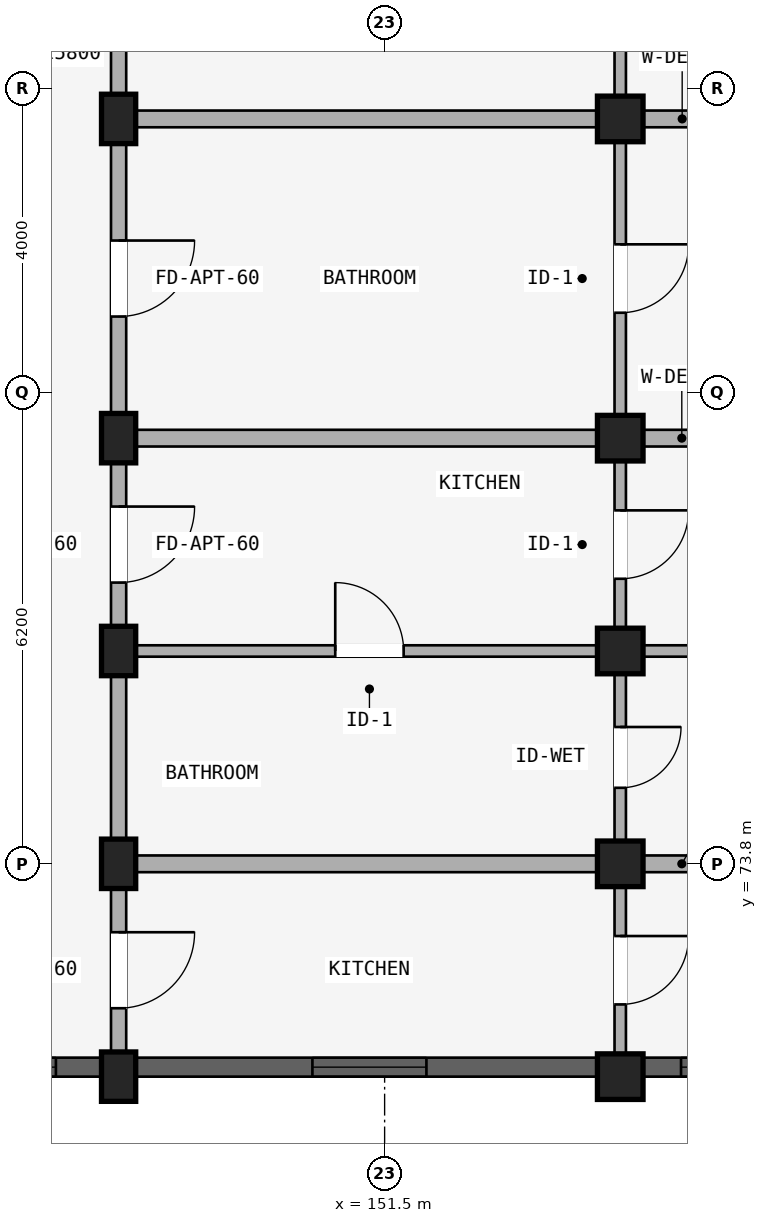
"""IFC4 building model, lengths in metres.
Left out: names, types, materials, properties, quantities, classifications, styles, units other than length and angle.
Written with IfcOpenShell. Run it as: python <this file> out.ifc"""

import sys

from ifc_helpers import new_model, si_unit, direction, frame, frame_2d, origin, origin_2d, place, context, subcontext, project, spatial, rectangle, extrude, element, fill, save


model = new_model("IFC4")
c1 = context("Model", 3, precision=1e-05, world=origin(), true_north=direction((0.0, 1.0)))
c2 = subcontext(c1, "Body", "Model", "MODEL_VIEW")
j1 = project(units=[si_unit("LENGTHUNIT", "METRE"), si_unit("PLANEANGLEUNIT", "RADIAN")], contexts=[c1])
p1 = place(None, origin())
s1 = spatial("IfcSite", under=j1, at=p1, CompositionType="ELEMENT")
p2 = place(p1, origin())
s2 = spatial("IfcBuilding", under=s1, at=p2, CompositionType="ELEMENT")
p3 = place(p2, frame((0.0, 0.0, 30.75)))
s3 = spatial("IfcBuildingStorey", under=s2, at=p3, CompositionType="ELEMENT", Elevation=30.75)
p4 = place(p3, frame((148.0, 83.6, 0.0), z_axis=(0.0, 0.0, 1.0), x_axis=(1.0, 0.0, 0.0)))
e1 = element("IfcColumn", 1, at=p4, inside=s3, PredefinedType="COLUMN", context=c2, shape_type="SweptSolid", body=[
    extrude(rectangle(XDim=0.45, YDim=0.65, at=origin_2d()), origin(), (0.0, 0.0, 1.0), 2.93),
])
p5 = place(p3, frame((154.6, 83.6, 0.0), z_axis=(0.0, 0.0, 1.0), x_axis=(1.0, 0.0, 0.0)))
e2 = element("IfcColumn", 2, at=p5, inside=s3, PredefinedType="COLUMN", context=c2, shape_type="SweptSolid", body=[
    extrude(rectangle(XDim=0.6, YDim=0.6, at=origin_2d()), origin(), (0.0, 0.0, 1.0), 2.93),
])
p6 = place(p3, frame((148.0, 79.4, 0.0), z_axis=(0.0, 0.0, 1.0), x_axis=(1.0, 0.0, 0.0)))
e3 = element("IfcColumn", 3, at=p6, inside=s3, PredefinedType="COLUMN", context=c2, shape_type="SweptSolid", body=[
    extrude(rectangle(XDim=0.45, YDim=0.65, at=origin_2d()), origin(), (0.0, 0.0, 1.0), 2.93),
])
p7 = place(p3, frame((154.6, 79.4, 0.0), z_axis=(0.0, 0.0, 1.0), x_axis=(1.0, 0.0, 0.0)))
e4 = element("IfcColumn", 4, at=p7, inside=s3, PredefinedType="COLUMN", context=c2, shape_type="SweptSolid", body=[
    extrude(rectangle(XDim=0.6, YDim=0.6, at=origin_2d()), origin(), (0.0, 0.0, 1.0), 2.93),
])
p8 = place(p3, frame((148.0, 76.6, 0.0), z_axis=(0.0, 0.0, 1.0), x_axis=(1.0, 0.0, 0.0)))
e5 = element("IfcColumn", 5, at=p8, inside=s3, PredefinedType="COLUMN", context=c2, shape_type="SweptSolid", body=[
    extrude(rectangle(XDim=0.45, YDim=0.65, at=origin_2d()), origin(), (0.0, 0.0, 1.0), 2.93),
])
p9 = place(p3, frame((154.6, 76.6, 0.0), z_axis=(0.0, 0.0, 1.0), x_axis=(1.0, 0.0, 0.0)))
e6 = element("IfcColumn", 6, at=p9, inside=s3, PredefinedType="COLUMN", context=c2, shape_type="SweptSolid", body=[
    extrude(rectangle(XDim=0.6, YDim=0.6, at=origin_2d()), origin(), (0.0, 0.0, 1.0), 2.93),
])
p10 = place(p3, frame((148.0, 73.8, 0.0), z_axis=(0.0, 0.0, 1.0), x_axis=(1.0, 0.0, 0.0)))
e7 = element("IfcColumn", 7, at=p10, inside=s3, PredefinedType="COLUMN", context=c2, shape_type="SweptSolid", body=[
    extrude(rectangle(XDim=0.45, YDim=0.65, at=origin_2d()), origin(), (0.0, 0.0, 1.0), 2.93),
])
p11 = place(p3, frame((154.6, 73.8, 0.0), z_axis=(0.0, 0.0, 1.0), x_axis=(1.0, 0.0, 0.0)))
e8 = element("IfcColumn", 8, at=p11, inside=s3, PredefinedType="COLUMN", context=c2, shape_type="SweptSolid", body=[
    extrude(rectangle(XDim=0.6, YDim=0.6, at=origin_2d()), origin(), (0.0, 0.0, 1.0), 2.93),
])
p12 = place(p3, frame((148.0, 71.0, 0.0), z_axis=(0.0, 0.0, 1.0), x_axis=(1.0, 0.0, 0.0)))
e9 = element("IfcColumn", 9, at=p12, inside=s3, PredefinedType="COLUMN", context=c2, shape_type="SweptSolid", body=[
    extrude(rectangle(XDim=0.45, YDim=0.65, at=origin_2d()), origin(), (0.0, 0.0, 1.0), 2.93),
])
p13 = place(p3, frame((154.6, 71.0, 0.0), z_axis=(0.0, 0.0, 1.0), x_axis=(1.0, 0.0, 0.0)))
e10 = element("IfcColumn", 10, at=p13, inside=s3, PredefinedType="COLUMN", context=c2, shape_type="SweptSolid", body=[
    extrude(rectangle(XDim=0.6, YDim=0.6, at=origin_2d()), origin(), (0.0, 0.0, 1.0), 2.93),
])
p14 = place(p3, frame((148.0, 87.65, 0.0), z_axis=(0.0, 0.0, 1.0), x_axis=(0.0, -1.0, 0.0)))
e11 = element("IfcWall", 11, at=p14, inside=s3, PredefinedType="STANDARD", context=c2, shape_type="SweptSolid", body=[
    extrude(rectangle(XDim=4.05, YDim=0.2, at=frame_2d((2.025, 0.0))), origin(), (0.0, 0.0, 1.0), 2.372),
])
p15 = place(p14, frame((1.525, 0.0, 0.0)))
e12 = element("IfcOpeningElement", 12, at=p15, cuts=e11, PredefinedType="OPENING", context=c2, shape_type="SweptSolid", body=[
    extrude(rectangle(XDim=1.0, YDim=2.15, at=frame_2d((0.5, 1.075))), frame((0.0, 0.11, 0.0), z_axis=(0.0, -1.0, 0.0), x_axis=(1.0, 0.0, 0.0)), (0.0, 0.0, 1.0), 0.22),
])
p16 = place(p3, frame((154.6, 87.57, 0.0), z_axis=(0.0, 0.0, 1.0), x_axis=(0.0, -1.0, 0.0)))
e13 = element("IfcWall", 13, at=p16, inside=s3, PredefinedType="PARTITIONING", context=c2, shape_type="SweptSolid", body=[
    extrude(rectangle(XDim=3.89, YDim=0.15, at=frame_2d((1.945, 0.0))), origin(), (0.0, 0.0, 1.0), 2.372),
])
p17 = place(p16, frame((1.495, 0.0, 0.0)))
e14 = element("IfcOpeningElement", 14, at=p17, cuts=e13, PredefinedType="OPENING", context=c2, shape_type="SweptSolid", body=[
    extrude(rectangle(XDim=0.9, YDim=2.1, at=frame_2d((0.45, 1.05))), frame((0.0, 0.085, 0.0), z_axis=(0.0, -1.0, 0.0), x_axis=(1.0, 0.0, 0.0)), (0.0, 0.0, 1.0), 0.17),
])
p18 = place(p3, frame((148.0, 83.6, 0.0), z_axis=(0.0, 0.0, 1.0), x_axis=(0.0, -1.0, 0.0)))
e15 = element("IfcWall", 15, at=p18, inside=s3, PredefinedType="STANDARD", context=c2, shape_type="SweptSolid", body=[
    extrude(rectangle(XDim=4.2, YDim=0.2, at=frame_2d((2.1, 0.0))), origin(), (0.0, 0.0, 1.0), 2.372),
])
p19 = place(p18, frame((1.6, 0.0, 0.0)))
e16 = element("IfcOpeningElement", 16, at=p19, cuts=e15, PredefinedType="OPENING", context=c2, shape_type="SweptSolid", body=[
    extrude(rectangle(XDim=1.0, YDim=2.15, at=frame_2d((0.5, 1.075))), frame((0.0, 0.11, 0.0), z_axis=(0.0, -1.0, 0.0), x_axis=(1.0, 0.0, 0.0)), (0.0, 0.0, 1.0), 0.22),
])
p20 = place(p3, frame((154.6, 83.52, 0.0), z_axis=(0.0, 0.0, 1.0), x_axis=(0.0, -1.0, 0.0)))
e17 = element("IfcWall", 17, at=p20, inside=s3, PredefinedType="PARTITIONING", context=c2, shape_type="SweptSolid", body=[
    extrude(rectangle(XDim=4.04, YDim=0.15, at=frame_2d((2.02, 0.0))), origin(), (0.0, 0.0, 1.0), 2.372),
])
p21 = place(p20, frame((1.57, 0.0, 0.0)))
e18 = element("IfcOpeningElement", 18, at=p21, cuts=e17, PredefinedType="OPENING", context=c2, shape_type="SweptSolid", body=[
    extrude(rectangle(XDim=0.9, YDim=2.1, at=frame_2d((0.45, 1.05))), frame((0.0, 0.085, 0.0), z_axis=(0.0, -1.0, 0.0), x_axis=(1.0, 0.0, 0.0)), (0.0, 0.0, 1.0), 0.17),
])
p22 = place(p3, frame((148.05, 83.6, 0.0), z_axis=(0.0, 0.0, 1.0), x_axis=(1.0, 0.0, 0.0)))
e19 = element("IfcWall", 19, at=p22, inside=s3, PredefinedType="STANDARD", context=c2, shape_type="SweptSolid", body=[
    extrude(rectangle(XDim=14.73, YDim=0.22, at=frame_2d((7.365, 0.0))), origin(), (0.0, 0.0, 1.0), 2.372),
])
p23 = place(p3, frame((148.0, 79.4, 0.0), z_axis=(0.0, 0.0, 1.0), x_axis=(0.0, -1.0, 0.0)))
e20 = element("IfcWall", 20, at=p23, inside=s3, PredefinedType="STANDARD", context=c2, shape_type="SweptSolid", body=[
    extrude(rectangle(XDim=2.8, YDim=0.2, at=frame_2d((1.4, 0.0))), origin(), (0.0, 0.0, 1.0), 2.372),
])
p24 = place(p23, frame((0.9, 0.0, 0.0)))
e21 = element("IfcOpeningElement", 21, at=p24, cuts=e20, PredefinedType="OPENING", context=c2, shape_type="SweptSolid", body=[
    extrude(rectangle(XDim=1.0, YDim=2.15, at=frame_2d((0.5, 1.075))), frame((0.0, 0.11, 0.0), z_axis=(0.0, -1.0, 0.0), x_axis=(1.0, 0.0, 0.0)), (0.0, 0.0, 1.0), 0.22),
])
p25 = place(p3, frame((154.6, 79.32, 0.0), z_axis=(0.0, 0.0, 1.0), x_axis=(0.0, -1.0, 0.0)))
e22 = element("IfcWall", 22, at=p25, inside=s3, PredefinedType="PLUMBINGWALL", context=c2, shape_type="SweptSolid", body=[
    extrude(rectangle(XDim=2.64, YDim=0.15, at=frame_2d((1.32, 0.0))), origin(), (0.0, 0.0, 1.0), 2.372),
])
p26 = place(p25, frame((0.87, 0.0, 0.0)))
e23 = element("IfcOpeningElement", 23, at=p26, cuts=e22, PredefinedType="OPENING", context=c2, shape_type="SweptSolid", body=[
    extrude(rectangle(XDim=0.9, YDim=2.1, at=frame_2d((0.45, 1.05))), frame((0.0, 0.085, 0.0), z_axis=(0.0, -1.0, 0.0), x_axis=(1.0, 0.0, 0.0)), (0.0, 0.0, 1.0), 0.17),
])
p27 = place(p3, frame((148.1, 79.4, 0.0), z_axis=(0.0, 0.0, 1.0), x_axis=(1.0, 0.0, 0.0)))
e24 = element("IfcWall", 24, at=p27, inside=s3, PredefinedType="STANDARD", context=c2, shape_type="SweptSolid", body=[
    extrude(rectangle(XDim=14.62, YDim=0.22, at=frame_2d((7.31, 0.0))), origin(), (0.0, 0.0, 1.0), 2.372),
])
p28 = place(p3, frame((148.0, 76.6, 0.0), z_axis=(0.0, 0.0, 1.0), x_axis=(0.0, -1.0, 0.0)))
e25 = element("IfcWall", 25, at=p28, inside=s3, PredefinedType="STANDARD", context=c2, shape_type="SweptSolid", body=[
    extrude(rectangle(XDim=2.8, YDim=0.2, at=frame_2d((1.4, 0.0))), origin(), (0.0, 0.0, 1.0), 2.372),
])
p29 = place(p3, frame((154.6, 76.52, 0.0), z_axis=(0.0, 0.0, 1.0), x_axis=(0.0, -1.0, 0.0)))
e26 = element("IfcWall", 26, at=p29, inside=s3, PredefinedType="PLUMBINGWALL", context=c2, shape_type="SweptSolid", body=[
    extrude(rectangle(XDim=2.64, YDim=0.15, at=frame_2d((1.32, 0.0))), origin(), (0.0, 0.0, 1.0), 2.372),
])
p30 = place(p29, frame((0.92, 0.0, 0.0)))
e27 = element("IfcOpeningElement", 27, at=p30, cuts=e26, PredefinedType="OPENING", context=c2, shape_type="SweptSolid", body=[
    extrude(rectangle(XDim=0.8, YDim=2.1, at=frame_2d((0.4, 1.05))), frame((0.0, 0.085, 0.0), z_axis=(0.0, -1.0, 0.0), x_axis=(1.0, 0.0, 0.0)), (0.0, 0.0, 1.0), 0.17),
])
p31 = place(p3, frame((148.1, 76.6, 0.0), z_axis=(0.0, 0.0, 1.0), x_axis=(1.0, 0.0, 0.0)))
e28 = element("IfcWall", 28, at=p31, inside=s3, PredefinedType="PARTITIONING", context=c2, shape_type="SweptSolid", body=[
    extrude(rectangle(XDim=14.62, YDim=0.15, at=frame_2d((7.31, 0.0))), origin(), (0.0, 0.0, 1.0), 2.372),
])
p32 = place(p31, frame((2.75, 0.0, 0.0)))
e29 = element("IfcOpeningElement", 29, at=p32, cuts=e28, PredefinedType="OPENING", context=c2, shape_type="SweptSolid", body=[
    extrude(rectangle(XDim=0.9, YDim=2.1, at=frame_2d((0.45, 1.05))), frame((0.0, 0.085, 0.0), z_axis=(0.0, -1.0, 0.0), x_axis=(1.0, 0.0, 0.0)), (0.0, 0.0, 1.0), 0.17),
])
p33 = place(p3, frame((148.0, 73.8, 0.0), z_axis=(0.0, 0.0, 1.0), x_axis=(0.0, -1.0, 0.0)))
e30 = element("IfcWall", 30, at=p33, inside=s3, PredefinedType="STANDARD", context=c2, shape_type="SweptSolid", body=[
    extrude(rectangle(XDim=2.8, YDim=0.2, at=frame_2d((1.4, 0.0))), origin(), (0.0, 0.0, 1.0), 2.372),
])
p34 = place(p33, frame((0.9, 0.0, 0.0)))
e31 = element("IfcOpeningElement", 31, at=p34, cuts=e30, PredefinedType="OPENING", context=c2, shape_type="SweptSolid", body=[
    extrude(rectangle(XDim=1.0, YDim=2.15, at=frame_2d((0.5, 1.075))), frame((0.0, 0.11, 0.0), z_axis=(0.0, -1.0, 0.0), x_axis=(1.0, 0.0, 0.0)), (0.0, 0.0, 1.0), 0.22),
])
p35 = place(p3, frame((154.6, 73.72, 0.0), z_axis=(0.0, 0.0, 1.0), x_axis=(0.0, -1.0, 0.0)))
e32 = element("IfcWall", 32, at=p35, inside=s3, PredefinedType="PLUMBINGWALL", context=c2, shape_type="SweptSolid", body=[
    extrude(rectangle(XDim=2.64, YDim=0.15, at=frame_2d((1.32, 0.0))), origin(), (0.0, 0.0, 1.0), 2.372),
])
p36 = place(p35, frame((0.87, 0.0, 0.0)))
e33 = element("IfcOpeningElement", 33, at=p36, cuts=e32, PredefinedType="OPENING", context=c2, shape_type="SweptSolid", body=[
    extrude(rectangle(XDim=0.9, YDim=2.1, at=frame_2d((0.45, 1.05))), frame((0.0, 0.085, 0.0), z_axis=(0.0, -1.0, 0.0), x_axis=(1.0, 0.0, 0.0)), (0.0, 0.0, 1.0), 0.17),
])
p37 = place(p3, frame((148.1, 73.8, 0.0), z_axis=(0.0, 0.0, 1.0), x_axis=(1.0, 0.0, 0.0)))
e34 = element("IfcWall", 34, at=p37, inside=s3, PredefinedType="STANDARD", context=c2, shape_type="SweptSolid", body=[
    extrude(rectangle(XDim=14.62, YDim=0.22, at=frame_2d((7.31, 0.0))), origin(), (0.0, 0.0, 1.0), 2.372),
])
p38 = place(p3, frame((145.829, 71.125, 0.0), z_axis=(0.0, 0.0, 1.0), x_axis=(1.0, 0.0, 0.0)))
e35 = element("IfcWall", 35, at=p38, inside=s3, PredefinedType="STANDARD", context=c2, shape_type="SweptSolid", body=[
    extrude(rectangle(XDim=1.943, YDim=0.25, at=frame_2d((0.971, 0.0))), origin(), (0.0, 0.0, 1.0), 2.372),
])
p39 = place(p38, frame((0.596, 0.0, 0.88)))
e36 = element("IfcOpeningElement", 36, at=p39, cuts=e35, PredefinedType="OPENING", context=c2, shape_type="SweptSolid", body=[
    extrude(rectangle(XDim=0.75, YDim=1.05, at=frame_2d((0.375, 0.525))), frame((0.0, 0.135, 0.0), z_axis=(0.0, -1.0, 0.0), x_axis=(1.0, 0.0, 0.0)), (0.0, 0.0, 1.0), 0.27),
])
p40 = place(p3, frame((148.229, 71.125, 0.0), z_axis=(0.0, 0.0, 1.0), x_axis=(1.0, 0.0, 0.0)))
e37 = element("IfcWall", 37, at=p40, inside=s3, PredefinedType="STANDARD", context=c2, shape_type="SweptSolid", body=[
    extrude(rectangle(XDim=6.068, YDim=0.25, at=frame_2d((3.034, 0.0))), origin(), (0.0, 0.0, 1.0), 2.372),
])
p41 = place(p40, frame((2.322, 0.0, 0.522)))
e38 = element("IfcOpeningElement", 38, at=p41, cuts=e37, PredefinedType="OPENING", context=c2, shape_type="SweptSolid", body=[
    extrude(rectangle(XDim=1.5, YDim=1.65, at=frame_2d((0.75, 0.825))), frame((0.0, 0.135, 0.0), z_axis=(0.0, -1.0, 0.0), x_axis=(1.0, 0.0, 0.0)), (0.0, 0.0, 1.0), 0.27),
])
p42 = place(p3, frame((154.904, 71.125, 0.0), z_axis=(0.0, 0.0, 1.0), x_axis=(1.0, 0.0, 0.0)))
e39 = element("IfcWall", 39, at=p42, inside=s3, PredefinedType="STANDARD", context=c2, shape_type="SweptSolid", body=[
    extrude(rectangle(XDim=2.193, YDim=0.25, at=frame_2d((1.096, 0.0))), origin(), (0.0, 0.0, 1.0), 2.372),
])
p43 = place(p42, frame((0.497, 0.0, 0.672)))
e40 = element("IfcOpeningElement", 40, at=p43, cuts=e39, PredefinedType="OPENING", context=c2, shape_type="SweptSolid", body=[
    extrude(rectangle(XDim=1.2, YDim=1.5, at=frame_2d((0.6, 0.75))), frame((0.0, 0.135, 0.0), z_axis=(0.0, -1.0, 0.0), x_axis=(1.0, 0.0, 0.0)), (0.0, 0.0, 1.0), 0.27),
])
p44 = place(p39, origin())
e41 = element("IfcWindow", 41, at=p44, inside=s3, PartitioningType="SINGLE_PANEL", PredefinedType="WINDOW", context=c2, shape_type="SweptSolid", body=[
    extrude(rectangle(XDim=0.75, YDim=1.05, at=frame_2d((0.375, 0.525))), frame((0.0, 0.03, 0.0), z_axis=(0.0, -1.0, 0.0), x_axis=(1.0, 0.0, 0.0)), (0.0, 0.0, 1.0), 0.06),
])
fill(e36, e41)
p45 = place(p41, origin())
e42 = element("IfcWindow", 42, at=p45, inside=s3, PartitioningType="DOUBLE_PANEL_VERTICAL", PredefinedType="WINDOW", context=c2, shape_type="SweptSolid", body=[
    extrude(rectangle(XDim=1.5, YDim=1.65, at=frame_2d((0.75, 0.825))), frame((0.0, 0.03, 0.0), z_axis=(0.0, -1.0, 0.0), x_axis=(1.0, 0.0, 0.0)), (0.0, 0.0, 1.0), 0.06),
])
fill(e38, e42)
p46 = place(p43, origin())
e43 = element("IfcWindow", 43, at=p46, inside=s3, PartitioningType="SINGLE_PANEL", PredefinedType="WINDOW", context=c2, shape_type="SweptSolid", body=[
    extrude(rectangle(XDim=1.2, YDim=1.5, at=frame_2d((0.6, 0.75))), frame((0.0, 0.03, 0.0), z_axis=(0.0, -1.0, 0.0), x_axis=(1.0, 0.0, 0.0)), (0.0, 0.0, 1.0), 0.06),
])
fill(e40, e43)
p47 = place(p19, frame((1.0, 0.0, 0.0), z_axis=(0.0, 0.0, 1.0), x_axis=(-1.0, 0.0, 0.0)))
e44 = element("IfcDoor", 44, at=p47, inside=s3, OperationType="SINGLE_SWING_RIGHT", PredefinedType="DOOR", context=c2, shape_type="SweptSolid", body=[
    extrude(rectangle(XDim=1.0, YDim=2.15, at=frame_2d((0.5, 1.075))), frame((0.0, 0.025, 0.0), z_axis=(0.0, -1.0, 0.0), x_axis=(1.0, 0.0, 0.0)), (0.0, 0.0, 1.0), 0.05),
])
fill(e16, e44)
p48 = place(p21, origin())
e45 = element("IfcDoor", 45, at=p48, inside=s3, OperationType="SINGLE_SWING_LEFT", PredefinedType="DOOR", context=c2, shape_type="SweptSolid", body=[
    extrude(rectangle(XDim=0.9, YDim=2.1, at=frame_2d((0.45, 1.05))), frame((0.0, 0.025, 0.0), z_axis=(0.0, -1.0, 0.0), x_axis=(1.0, 0.0, 0.0)), (0.0, 0.0, 1.0), 0.05),
])
fill(e18, e45)
p49 = place(p26, origin())
e46 = element("IfcDoor", 46, at=p49, inside=s3, OperationType="SINGLE_SWING_LEFT", PredefinedType="DOOR", context=c2, shape_type="SweptSolid", body=[
    extrude(rectangle(XDim=0.9, YDim=2.1, at=frame_2d((0.45, 1.05))), frame((0.0, 0.025, 0.0), z_axis=(0.0, -1.0, 0.0), x_axis=(1.0, 0.0, 0.0)), (0.0, 0.0, 1.0), 0.05),
])
fill(e23, e46)
p50 = place(p24, frame((1.0, 0.0, 0.0), z_axis=(0.0, 0.0, 1.0), x_axis=(-1.0, 0.0, 0.0)))
e47 = element("IfcDoor", 47, at=p50, inside=s3, OperationType="SINGLE_SWING_RIGHT", PredefinedType="DOOR", context=c2, shape_type="SweptSolid", body=[
    extrude(rectangle(XDim=1.0, YDim=2.15, at=frame_2d((0.5, 1.075))), frame((0.0, 0.025, 0.0), z_axis=(0.0, -1.0, 0.0), x_axis=(1.0, 0.0, 0.0)), (0.0, 0.0, 1.0), 0.05),
])
fill(e21, e47)
p51 = place(p30, origin())
e48 = element("IfcDoor", 48, at=p51, inside=s3, OperationType="SINGLE_SWING_LEFT", PredefinedType="DOOR", context=c2, shape_type="SweptSolid", body=[
    extrude(rectangle(XDim=0.8, YDim=2.1, at=frame_2d((0.4, 1.05))), frame((0.0, 0.025, 0.0), z_axis=(0.0, -1.0, 0.0), x_axis=(1.0, 0.0, 0.0)), (0.0, 0.0, 1.0), 0.05),
])
fill(e27, e48)
p52 = place(p32, origin())
e49 = element("IfcDoor", 49, at=p52, inside=s3, OperationType="SINGLE_SWING_LEFT", PredefinedType="DOOR", context=c2, shape_type="SweptSolid", body=[
    extrude(rectangle(XDim=0.9, YDim=2.1, at=frame_2d((0.45, 1.05))), frame((0.0, 0.025, 0.0), z_axis=(0.0, -1.0, 0.0), x_axis=(1.0, 0.0, 0.0)), (0.0, 0.0, 1.0), 0.05),
])
fill(e29, e49)
p53 = place(p36, origin())
e50 = element("IfcDoor", 50, at=p53, inside=s3, OperationType="SINGLE_SWING_LEFT", PredefinedType="DOOR", context=c2, shape_type="SweptSolid", body=[
    extrude(rectangle(XDim=0.9, YDim=2.1, at=frame_2d((0.45, 1.05))), frame((0.0, 0.025, 0.0), z_axis=(0.0, -1.0, 0.0), x_axis=(1.0, 0.0, 0.0)), (0.0, 0.0, 1.0), 0.05),
])
fill(e33, e50)
p54 = place(p34, frame((1.0, 0.0, 0.0), z_axis=(0.0, 0.0, 1.0), x_axis=(-1.0, 0.0, 0.0)))
e51 = element("IfcDoor", 51, at=p54, inside=s3, OperationType="SINGLE_SWING_RIGHT", PredefinedType="DOOR", context=c2, shape_type="SweptSolid", body=[
    extrude(rectangle(XDim=1.0, YDim=2.15, at=frame_2d((0.5, 1.075))), frame((0.0, 0.025, 0.0), z_axis=(0.0, -1.0, 0.0), x_axis=(1.0, 0.0, 0.0)), (0.0, 0.0, 1.0), 0.05),
])
fill(e31, e51)
save(model, sys.argv[1])
